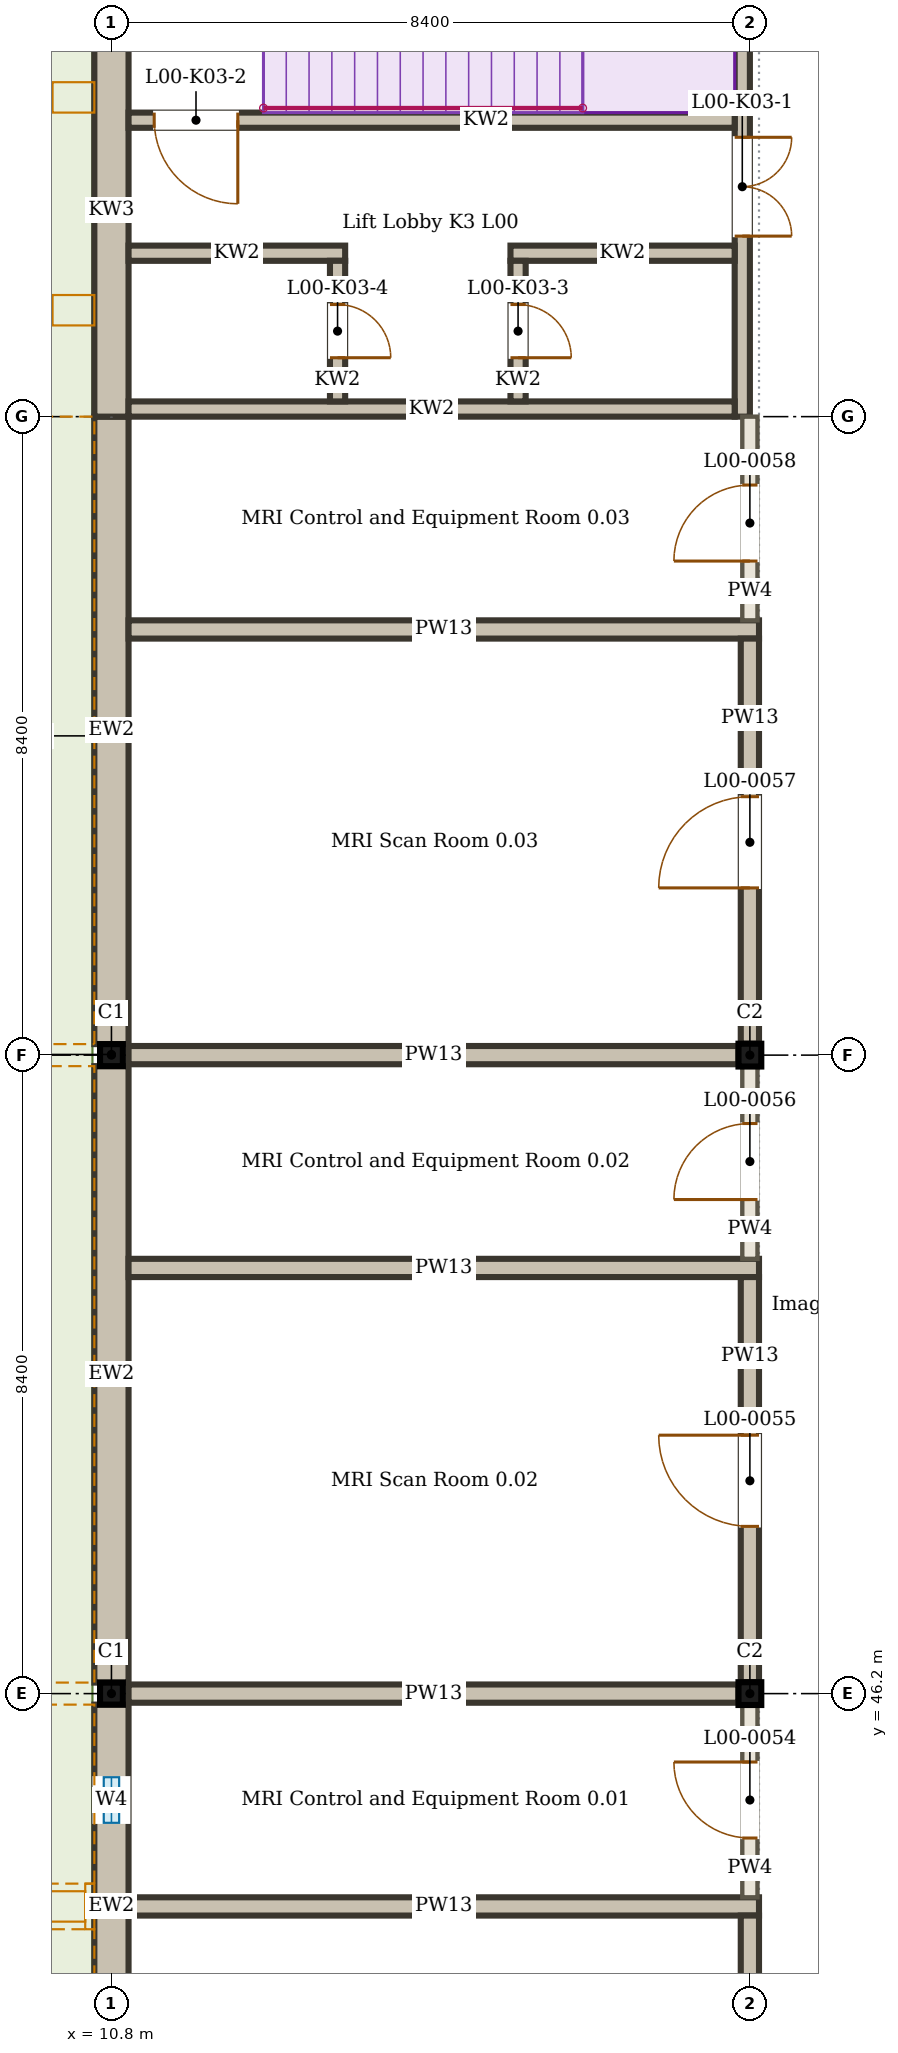
"""IFC4 building model, lengths in metres.
Left out: names, types, materials, properties, quantities, classifications, styles, units other than length and angle.
Written with IfcOpenShell. Run it as: python <this file> out.ifc"""

import sys

from ifc_helpers import new_model, si_unit, direction, frame, frame_2d, origin, origin_2d, place, context, subcontext, project, spatial, rectangle, i_section, extrude, element, fill, save


model = new_model("IFC4")
c1 = context("Model", 3, precision=1e-05, world=origin(), true_north=direction((0.0, 1.0)))
c2 = subcontext(c1, "Body", "Model", "MODEL_VIEW")
j1 = project(units=[si_unit("LENGTHUNIT", "METRE"), si_unit("PLANEANGLEUNIT", "RADIAN")], contexts=[c1])
p1 = place(None, origin())
s1 = spatial("IfcSite", under=j1, at=p1, CompositionType="ELEMENT")
p2 = place(p1, origin())
s2 = spatial("IfcBuilding", under=s1, at=p2, CompositionType="ELEMENT")
p3 = place(p2, origin())
s3 = spatial("IfcBuildingStorey", under=s2, at=p3, CompositionType="ELEMENT", Elevation=0.0)
p4 = place(p3, frame((10.8, 46.2, 0.0), z_axis=(0.0, 0.0, 1.0), x_axis=(1.0, 0.0, 0.0)))
e1 = element("IfcColumn", 1, at=p4, inside=s3, PredefinedType="COLUMN", context=c2, shape_type="SweptSolid", body=[
    extrude(i_section(OverallWidth=0.3, OverallDepth=0.29, WebThickness=0.009, FlangeThickness=0.014, FilletRadius=0.027, at=origin_2d()), origin(), (0.0, 0.0, 1.0), 4.5),
])
p5 = place(p3, frame((19.2, 46.2, 0.0), z_axis=(0.0, 0.0, 1.0), x_axis=(1.0, 0.0, 0.0)))
e2 = element("IfcColumn", 2, at=p5, inside=s3, PredefinedType="COLUMN", context=c2, shape_type="SweptSolid", body=[
    extrude(i_section(OverallWidth=0.3, OverallDepth=0.3, WebThickness=0.011, FlangeThickness=0.019, FilletRadius=0.027, at=origin_2d()), origin(), (0.0, 0.0, 1.0), 4.5),
])
p6 = place(p3, frame((10.8, 54.6, 0.0), z_axis=(0.0, 0.0, 1.0), x_axis=(1.0, 0.0, 0.0)))
e3 = element("IfcColumn", 3, at=p6, inside=s3, PredefinedType="COLUMN", context=c2, shape_type="SweptSolid", body=[
    extrude(i_section(OverallWidth=0.3, OverallDepth=0.29, WebThickness=0.009, FlangeThickness=0.014, FilletRadius=0.027, at=origin_2d()), origin(), (0.0, 0.0, 1.0), 4.5),
])
p7 = place(p3, frame((19.2, 54.6, 0.0), z_axis=(0.0, 0.0, 1.0), x_axis=(1.0, 0.0, 0.0)))
e4 = element("IfcColumn", 4, at=p7, inside=s3, PredefinedType="COLUMN", context=c2, shape_type="SweptSolid", body=[
    extrude(i_section(OverallWidth=0.3, OverallDepth=0.3, WebThickness=0.011, FlangeThickness=0.019, FilletRadius=0.027, at=origin_2d()), origin(), (0.0, 0.0, 1.0), 4.5),
])
p8 = place(p3, frame((10.8, 37.8, 0.0), z_axis=(0.0, 0.0, 1.0), x_axis=(0.0, 1.0, 0.0)))
e5 = element("IfcWall", 5, at=p8, inside=s3, PredefinedType="SOLIDWALL", context=c2, shape_type="SweptSolid", body=[
    extrude(rectangle(XDim=8.255, YDim=0.45, at=frame_2d((4.127, 0.0))), origin(), (0.0, 0.0, 1.0), 3.85),
])
p9 = place(p8, frame((1.1, 0.0, 2.1)))
e6 = element("IfcOpeningElement", 6, at=p9, cuts=e5, PredefinedType="OPENING", context=c2, shape_type="SweptSolid", body=[
    extrude(rectangle(XDim=0.6, YDim=1.2, at=frame_2d((0.3, 0.6))), frame((0.0, 0.235, 0.0), z_axis=(0.0, -1.0, 0.0), x_axis=(1.0, 0.0, 0.0)), (0.0, 0.0, 1.0), 0.47),
])
p10 = place(p8, frame((3.9, 0.0, 2.1)))
e7 = element("IfcOpeningElement", 7, at=p10, cuts=e5, PredefinedType="OPENING", context=c2, shape_type="SweptSolid", body=[
    extrude(rectangle(XDim=0.6, YDim=1.2, at=frame_2d((0.3, 0.6))), frame((0.0, 0.235, 0.0), z_axis=(0.0, -1.0, 0.0), x_axis=(1.0, 0.0, 0.0)), (0.0, 0.0, 1.0), 0.47),
])
p11 = place(p8, frame((6.7, 0.0, 2.1)))
e8 = element("IfcOpeningElement", 8, at=p11, cuts=e5, PredefinedType="OPENING", context=c2, shape_type="SweptSolid", body=[
    extrude(rectangle(XDim=0.6, YDim=1.2, at=frame_2d((0.3, 0.6))), frame((0.0, 0.235, 0.0), z_axis=(0.0, -1.0, 0.0), x_axis=(1.0, 0.0, 0.0)), (0.0, 0.0, 1.0), 0.47),
])
p12 = place(p3, frame((10.64, 37.8, 3.87), z_axis=(0.0, 0.0, 1.0), x_axis=(0.0, 1.0, 0.0)))
e9 = element("IfcWall", 9, at=p12, inside=s3, PredefinedType="SOLIDWALL", context=c2, shape_type="SweptSolid", body=[
    extrude(rectangle(XDim=8.4, YDim=0.13, at=frame_2d((4.2, 0.0))), origin(), (0.0, 0.0, 1.0), 0.63),
])
p13 = place(p3, frame((10.8, 46.345, 0.0), z_axis=(0.0, 0.0, 1.0), x_axis=(0.0, 1.0, 0.0)))
e10 = element("IfcWall", 10, at=p13, inside=s3, PredefinedType="SOLIDWALL", context=c2, shape_type="SweptSolid", body=[
    extrude(rectangle(XDim=8.11, YDim=0.45, at=frame_2d((4.055, 0.0))), origin(), (0.0, 0.0, 1.0), 3.85),
])
p14 = place(p3, frame((10.64, 46.2, 3.87), z_axis=(0.0, 0.0, 1.0), x_axis=(0.0, 1.0, 0.0)))
e11 = element("IfcWall", 11, at=p14, inside=s3, PredefinedType="SOLIDWALL", context=c2, shape_type="SweptSolid", body=[
    extrude(rectangle(XDim=8.4, YDim=0.13, at=frame_2d((4.2, 0.0))), origin(), (0.0, 0.0, 1.0), 0.63),
])
p15 = place(p3, frame((10.8, 54.745, 0.0), z_axis=(0.0, 0.0, 1.0), x_axis=(0.0, 1.0, 0.0)))
e12 = element("IfcWall", 12, at=p15, inside=s3, PredefinedType="SOLIDWALL", context=c2, shape_type="SweptSolid", body=[
    extrude(rectangle(XDim=8.255, YDim=0.45, at=frame_2d((4.127, 0.0))), origin(), (0.0, 0.0, 1.0), 3.85),
])
p16 = place(p3, frame((10.64, 54.6, 3.87), z_axis=(0.0, 0.0, 1.0), x_axis=(0.0, 1.0, 0.0)))
e13 = element("IfcWall", 13, at=p16, inside=s3, PredefinedType="SOLIDWALL", context=c2, shape_type="SweptSolid", body=[
    extrude(rectangle(XDim=8.4, YDim=0.13, at=frame_2d((4.2, 0.0))), origin(), (0.0, 0.0, 1.0), 0.63),
])
p17 = place(p3, frame((11.025, 43.4, 0.0), z_axis=(0.0, 0.0, 1.0), x_axis=(1.0, 0.0, 0.0)))
e14 = element("IfcWall", 14, at=p17, inside=s3, PredefinedType="SOLIDWALL", context=c2, shape_type="SweptSolid", body=[
    extrude(rectangle(XDim=8.295, YDim=0.24, at=frame_2d((4.147, 0.0))), origin(), (0.0, 0.0, 1.0), 3.8),
])
p18 = place(p3, frame((11.025, 46.2, 0.0), z_axis=(0.0, 0.0, 1.0), x_axis=(1.0, 0.0, 0.0)))
e15 = element("IfcWall", 15, at=p18, inside=s3, PredefinedType="SOLIDWALL", context=c2, shape_type="SweptSolid", body=[
    extrude(rectangle(XDim=8.025, YDim=0.24, at=frame_2d((4.013, 0.0))), origin(), (0.0, 0.0, 1.0), 3.8),
])
p19 = place(p3, frame((11.025, 51.8, 0.0), z_axis=(0.0, 0.0, 1.0), x_axis=(1.0, 0.0, 0.0)))
e16 = element("IfcWall", 16, at=p19, inside=s3, PredefinedType="SOLIDWALL", context=c2, shape_type="SweptSolid", body=[
    extrude(rectangle(XDim=8.295, YDim=0.24, at=frame_2d((4.147, 0.0))), origin(), (0.0, 0.0, 1.0), 3.8),
])
p20 = place(p3, frame((11.025, 54.6, 0.0), z_axis=(0.0, 0.0, 1.0), x_axis=(1.0, 0.0, 0.0)))
e17 = element("IfcWall", 17, at=p20, inside=s3, PredefinedType="SOLIDWALL", context=c2, shape_type="SweptSolid", body=[
    extrude(rectangle(XDim=8.025, YDim=0.24, at=frame_2d((4.013, 0.0))), origin(), (0.0, 0.0, 1.0), 3.8),
])
p21 = place(p3, frame((11.025, 60.2, 0.0), z_axis=(0.0, 0.0, 1.0), x_axis=(1.0, 0.0, 0.0)))
e18 = element("IfcWall", 18, at=p21, inside=s3, PredefinedType="SOLIDWALL", context=c2, shape_type="SweptSolid", body=[
    extrude(rectangle(XDim=8.295, YDim=0.24, at=frame_2d((4.147, 0.0))), origin(), (0.0, 0.0, 1.0), 3.8),
])
p22 = place(p3, frame((19.2, 37.8, 0.0), z_axis=(0.0, 0.0, 1.0), x_axis=(0.0, 1.0, 0.0)))
e19 = element("IfcWall", 19, at=p22, inside=s3, PredefinedType="SOLIDWALL", context=c2, shape_type="SweptSolid", body=[
    extrude(rectangle(XDim=5.48, YDim=0.24, at=frame_2d((2.74, 0.0))), origin(), (0.0, 0.0, 1.0), 3.8),
])
p23 = place(p22, frame((2.2, 0.0, 0.0)))
e20 = element("IfcOpeningElement", 20, at=p23, cuts=e19, PredefinedType="OPENING", context=c2, shape_type="SweptSolid", body=[
    extrude(rectangle(XDim=1.2, YDim=2.1, at=frame_2d((0.6, 1.05))), frame((0.0, 0.13, 0.0), z_axis=(0.0, -1.0, 0.0), x_axis=(1.0, 0.0, 0.0)), (0.0, 0.0, 1.0), 0.26),
])
p24 = place(p3, frame((19.2, 43.52, 0.0), z_axis=(0.0, 0.0, 1.0), x_axis=(0.0, 1.0, 0.0)))
e21 = element("IfcWall", 21, at=p24, inside=s3, PredefinedType="PARTITIONING", context=c2, shape_type="SweptSolid", body=[
    extrude(rectangle(XDim=2.53, YDim=0.2, at=frame_2d((1.265, 0.0))), origin(), (0.0, 0.0, 1.0), 3.8),
])
p25 = place(p24, frame((0.78, 0.0, 0.0)))
e22 = element("IfcOpeningElement", 22, at=p25, cuts=e21, PredefinedType="OPENING", context=c2, shape_type="SweptSolid", body=[
    extrude(rectangle(XDim=1.0, YDim=2.1, at=frame_2d((0.5, 1.05))), frame((0.0, 0.11, 0.0), z_axis=(0.0, -1.0, 0.0), x_axis=(1.0, 0.0, 0.0)), (0.0, 0.0, 1.0), 0.22),
])
p26 = place(p3, frame((19.2, 46.35, 0.0), z_axis=(0.0, 0.0, 1.0), x_axis=(0.0, 1.0, 0.0)))
e23 = element("IfcWall", 23, at=p26, inside=s3, PredefinedType="SOLIDWALL", context=c2, shape_type="SweptSolid", body=[
    extrude(rectangle(XDim=5.33, YDim=0.24, at=frame_2d((2.665, 0.0))), origin(), (0.0, 0.0, 1.0), 3.8),
])
p27 = place(p26, frame((2.05, 0.0, 0.0)))
e24 = element("IfcOpeningElement", 24, at=p27, cuts=e23, PredefinedType="OPENING", context=c2, shape_type="SweptSolid", body=[
    extrude(rectangle(XDim=1.2, YDim=2.1, at=frame_2d((0.6, 1.05))), frame((0.0, 0.13, 0.0), z_axis=(0.0, -1.0, 0.0), x_axis=(1.0, 0.0, 0.0)), (0.0, 0.0, 1.0), 0.26),
])
p28 = place(p3, frame((19.2, 51.92, 0.0), z_axis=(0.0, 0.0, 1.0), x_axis=(0.0, 1.0, 0.0)))
e25 = element("IfcWall", 25, at=p28, inside=s3, PredefinedType="PARTITIONING", context=c2, shape_type="SweptSolid", body=[
    extrude(rectangle(XDim=2.53, YDim=0.2, at=frame_2d((1.265, 0.0))), origin(), (0.0, 0.0, 1.0), 3.8),
])
p29 = place(p28, frame((0.78, 0.0, 0.0)))
e26 = element("IfcOpeningElement", 26, at=p29, cuts=e25, PredefinedType="OPENING", context=c2, shape_type="SweptSolid", body=[
    extrude(rectangle(XDim=1.0, YDim=2.1, at=frame_2d((0.5, 1.05))), frame((0.0, 0.11, 0.0), z_axis=(0.0, -1.0, 0.0), x_axis=(1.0, 0.0, 0.0)), (0.0, 0.0, 1.0), 0.22),
])
p30 = place(p3, frame((19.2, 54.75, 0.0), z_axis=(0.0, 0.0, 1.0), x_axis=(0.0, 1.0, 0.0)))
e27 = element("IfcWall", 27, at=p30, inside=s3, PredefinedType="SOLIDWALL", context=c2, shape_type="SweptSolid", body=[
    extrude(rectangle(XDim=5.33, YDim=0.24, at=frame_2d((2.665, 0.0))), origin(), (0.0, 0.0, 1.0), 3.8),
])
p31 = place(p30, frame((2.05, 0.0, 0.0)))
e28 = element("IfcOpeningElement", 28, at=p31, cuts=e27, PredefinedType="OPENING", context=c2, shape_type="SweptSolid", body=[
    extrude(rectangle(XDim=1.2, YDim=2.1, at=frame_2d((0.6, 1.05))), frame((0.0, 0.13, 0.0), z_axis=(0.0, -1.0, 0.0), x_axis=(1.0, 0.0, 0.0)), (0.0, 0.0, 1.0), 0.26),
])
p32 = place(p3, frame((19.2, 60.32, 0.0), z_axis=(0.0, 0.0, 1.0), x_axis=(0.0, 1.0, 0.0)))
e29 = element("IfcWall", 29, at=p32, inside=s3, PredefinedType="PARTITIONING", context=c2, shape_type="SweptSolid", body=[
    extrude(rectangle(XDim=2.68, YDim=0.2, at=frame_2d((1.34, 0.0))), origin(), (0.0, 0.0, 1.0), 3.8),
])
p33 = place(p32, frame((0.78, 0.0, 0.0)))
e30 = element("IfcOpeningElement", 30, at=p33, cuts=e29, PredefinedType="OPENING", context=c2, shape_type="SweptSolid", body=[
    extrude(rectangle(XDim=1.0, YDim=2.1, at=frame_2d((0.5, 1.05))), frame((0.0, 0.11, 0.0), z_axis=(0.0, -1.0, 0.0), x_axis=(1.0, 0.0, 0.0)), (0.0, 0.0, 1.0), 0.22),
])
p34 = place(p3, frame((19.1, 71.4, 0.0), z_axis=(0.0, 0.0, 1.0), x_axis=(0.0, -1.0, 0.0)))
e31 = element("IfcWall", 31, at=p34, inside=s3, PredefinedType="SOLIDWALL", context=c2, shape_type="SweptSolid", body=[
    extrude(rectangle(XDim=8.4, YDim=0.2, at=frame_2d((4.2, 0.0))), origin(), (0.0, 0.0, 1.0), 4.5),
])
p35 = place(p34, frame((4.725, 0.0, 0.0)))
e32 = element("IfcOpeningElement", 32, at=p35, cuts=e31, PredefinedType="OPENING", context=c2, shape_type="SweptSolid", body=[
    extrude(rectangle(XDim=1.3, YDim=2.1, at=frame_2d((0.65, 1.05))), frame((0.0, 0.11, 0.0), z_axis=(0.0, -1.0, 0.0), x_axis=(1.0, 0.0, 0.0)), (0.0, 0.0, 1.0), 0.22),
])
p36 = place(p3, frame((10.8, 71.4, 0.0), z_axis=(0.0, 0.0, 1.0), x_axis=(0.0, -1.0, 0.0)))
e33 = element("IfcWall", 33, at=p36, inside=s3, PredefinedType="SOLIDWALL", context=c2, shape_type="SweptSolid", body=[
    extrude(rectangle(XDim=8.4, YDim=0.45, at=frame_2d((4.2, 0.0))), origin(), (0.0, 0.0, 1.0), 4.5),
])
p37 = place(p36, frame((1.65, 0.0, 0.0)))
e34 = element("IfcOpeningElement", 34, at=p37, cuts=e33, PredefinedType="OPENING", context=c2, shape_type="SweptSolid", body=[
    extrude(rectangle(XDim=1.3, YDim=2.1, at=frame_2d((0.65, 1.05))), frame((0.0, 0.235, 0.0), z_axis=(0.0, -1.0, 0.0), x_axis=(1.0, 0.0, 0.0)), (0.0, 0.0, 1.0), 0.47),
])
p38 = place(p3, frame((19.0, 63.1, 0.0), z_axis=(0.0, 0.0, 1.0), x_axis=(-1.0, 0.0, 0.0)))
e35 = element("IfcWall", 35, at=p38, inside=s3, PredefinedType="SOLIDWALL", context=c2, shape_type="SweptSolid", body=[
    extrude(rectangle(XDim=7.975, YDim=0.2, at=frame_2d((3.988, 0.0))), origin(), (0.0, 0.0, 1.0), 4.5),
])
p39 = place(p3, frame((19.0, 66.9, 0.0), z_axis=(0.0, 0.0, 1.0), x_axis=(-1.0, 0.0, 0.0)))
e36 = element("IfcWall", 36, at=p39, inside=s3, PredefinedType="SOLIDWALL", context=c2, shape_type="SweptSolid", body=[
    extrude(rectangle(XDim=7.975, YDim=0.2, at=frame_2d((3.988, 0.0))), origin(), (0.0, 0.0, 1.0), 4.5),
])
p40 = place(p39, frame((6.538, 0.0, 0.0)))
e37 = element("IfcOpeningElement", 37, at=p40, cuts=e36, PredefinedType="OPENING", context=c2, shape_type="SweptSolid", body=[
    extrude(rectangle(XDim=1.1, YDim=2.1, at=frame_2d((0.55, 1.05))), frame((0.0, 0.11, 0.0), z_axis=(0.0, -1.0, 0.0), x_axis=(1.0, 0.0, 0.0)), (0.0, 0.0, 1.0), 0.22),
])
p41 = place(p3, frame((19.0, 65.15, 0.0), z_axis=(0.0, 0.0, 1.0), x_axis=(-1.0, 0.0, 0.0)))
e38 = element("IfcWall", 38, at=p41, inside=s3, PredefinedType="SOLIDWALL", context=c2, shape_type="SweptSolid", body=[
    extrude(rectangle(XDim=2.95, YDim=0.2, at=frame_2d((1.475, 0.0))), origin(), (0.0, 0.0, 1.0), 4.35),
])
p42 = place(p3, frame((13.875, 65.15, 0.0), z_axis=(0.0, 0.0, 1.0), x_axis=(-1.0, 0.0, 0.0)))
e39 = element("IfcWall", 39, at=p42, inside=s3, PredefinedType="SOLIDWALL", context=c2, shape_type="SweptSolid", body=[
    extrude(rectangle(XDim=2.85, YDim=0.2, at=frame_2d((1.425, 0.0))), origin(), (0.0, 0.0, 1.0), 4.35),
])
p43 = place(p3, frame((16.15, 65.05, 0.0), z_axis=(0.0, 0.0, 1.0), x_axis=(0.0, -1.0, 0.0)))
e40 = element("IfcWall", 40, at=p43, inside=s3, PredefinedType="SOLIDWALL", context=c2, shape_type="SweptSolid", body=[
    extrude(rectangle(XDim=1.85, YDim=0.2, at=frame_2d((0.925, 0.0))), origin(), (0.0, 0.0, 1.0), 4.35),
])
p44 = place(p43, frame((0.575, 0.0, 0.0)))
e41 = element("IfcOpeningElement", 41, at=p44, cuts=e40, PredefinedType="OPENING", context=c2, shape_type="SweptSolid", body=[
    extrude(rectangle(XDim=0.7, YDim=2.1, at=frame_2d((0.35, 1.05))), frame((0.0, 0.11, 0.0), z_axis=(0.0, -1.0, 0.0), x_axis=(1.0, 0.0, 0.0)), (0.0, 0.0, 1.0), 0.22),
])
p45 = place(p3, frame((13.775, 65.05, 0.0), z_axis=(0.0, 0.0, 1.0), x_axis=(0.0, -1.0, 0.0)))
e42 = element("IfcWall", 42, at=p45, inside=s3, PredefinedType="SOLIDWALL", context=c2, shape_type="SweptSolid", body=[
    extrude(rectangle(XDim=1.85, YDim=0.2, at=frame_2d((0.925, 0.0))), origin(), (0.0, 0.0, 1.0), 4.35),
])
p46 = place(p45, frame((0.575, 0.0, 0.0)))
e43 = element("IfcOpeningElement", 43, at=p46, cuts=e42, PredefinedType="OPENING", context=c2, shape_type="SweptSolid", body=[
    extrude(rectangle(XDim=0.7, YDim=2.1, at=frame_2d((0.35, 1.05))), frame((0.0, 0.11, 0.0), z_axis=(0.0, -1.0, 0.0), x_axis=(1.0, 0.0, 0.0)), (0.0, 0.0, 1.0), 0.22),
])
p47 = place(p11, origin())
e44 = element("IfcWindow", 44, at=p47, inside=s3, PartitioningType="SINGLE_PANEL", PredefinedType="WINDOW", context=c2, shape_type="SweptSolid", body=[
    extrude(rectangle(XDim=0.6, YDim=1.2, at=frame_2d((0.3, 0.6))), frame((0.0, -0.075, 0.0), z_axis=(0.0, -1.0, 0.0), x_axis=(1.0, 0.0, 0.0)), (0.0, 0.0, 1.0), 0.06),
])
fill(e8, e44)
p48 = place(p25, origin())
e45 = element("IfcDoor", 45, at=p48, inside=s3, OperationType="SINGLE_SWING_RIGHT", PredefinedType="DOOR", context=c2, shape_type="SweptSolid", body=[
    extrude(rectangle(XDim=1.0, YDim=2.1, at=frame_2d((0.5, 1.05))), frame((0.0, 0.025, 0.0), z_axis=(0.0, -1.0, 0.0), x_axis=(1.0, 0.0, 0.0)), (0.0, 0.0, 1.0), 0.05),
])
fill(e22, e45)
p49 = place(p27, origin())
e46 = element("IfcDoor", 46, at=p49, inside=s3, OperationType="SINGLE_SWING_RIGHT", PredefinedType="DOOR", context=c2, shape_type="SweptSolid", body=[
    extrude(rectangle(XDim=1.2, YDim=2.1, at=frame_2d((0.6, 1.05))), frame((0.0, 0.025, 0.0), z_axis=(0.0, -1.0, 0.0), x_axis=(1.0, 0.0, 0.0)), (0.0, 0.0, 1.0), 0.05),
])
fill(e24, e46)
p50 = place(p29, origin())
e47 = element("IfcDoor", 47, at=p50, inside=s3, OperationType="SINGLE_SWING_LEFT", PredefinedType="DOOR", context=c2, shape_type="SweptSolid", body=[
    extrude(rectangle(XDim=1.0, YDim=2.1, at=frame_2d((0.5, 1.05))), frame((0.0, 0.025, 0.0), z_axis=(0.0, -1.0, 0.0), x_axis=(1.0, 0.0, 0.0)), (0.0, 0.0, 1.0), 0.05),
])
fill(e26, e47)
p51 = place(p31, origin())
e48 = element("IfcDoor", 48, at=p51, inside=s3, OperationType="SINGLE_SWING_LEFT", PredefinedType="DOOR", context=c2, shape_type="SweptSolid", body=[
    extrude(rectangle(XDim=1.2, YDim=2.1, at=frame_2d((0.6, 1.05))), frame((0.0, 0.025, 0.0), z_axis=(0.0, -1.0, 0.0), x_axis=(1.0, 0.0, 0.0)), (0.0, 0.0, 1.0), 0.05),
])
fill(e28, e48)
p52 = place(p33, origin())
e49 = element("IfcDoor", 49, at=p52, inside=s3, OperationType="SINGLE_SWING_LEFT", PredefinedType="DOOR", context=c2, shape_type="SweptSolid", body=[
    extrude(rectangle(XDim=1.0, YDim=2.1, at=frame_2d((0.5, 1.05))), frame((0.0, 0.025, 0.0), z_axis=(0.0, -1.0, 0.0), x_axis=(1.0, 0.0, 0.0)), (0.0, 0.0, 1.0), 0.05),
])
fill(e30, e49)
p53 = place(p35, origin())
e50 = element("IfcDoor", 50, at=p53, inside=s3, OperationType="DOUBLE_DOOR_DOUBLE_SWING", PredefinedType="DOOR", context=c2, shape_type="SweptSolid", body=[
    extrude(rectangle(XDim=1.3, YDim=2.1, at=frame_2d((0.65, 1.05))), frame((0.0, 0.025, 0.0), z_axis=(0.0, -1.0, 0.0), x_axis=(1.0, 0.0, 0.0)), (0.0, 0.0, 1.0), 0.05),
])
fill(e32, e50)
p54 = place(p40, origin())
e51 = element("IfcDoor", 51, at=p54, inside=s3, OperationType="SINGLE_SWING_LEFT", PredefinedType="DOOR", context=c2, shape_type="SweptSolid", body=[
    extrude(rectangle(XDim=1.1, YDim=2.1, at=frame_2d((0.55, 1.05))), frame((0.0, 0.025, 0.0), z_axis=(0.0, -1.0, 0.0), x_axis=(1.0, 0.0, 0.0)), (0.0, 0.0, 1.0), 0.05),
])
fill(e37, e51)
p55 = place(p44, origin())
e52 = element("IfcDoor", 52, at=p55, inside=s3, OperationType="SINGLE_SWING_RIGHT", PredefinedType="DOOR", context=c2, shape_type="SweptSolid", body=[
    extrude(rectangle(XDim=0.7, YDim=2.1, at=frame_2d((0.35, 1.05))), frame((0.0, 0.025, 0.0), z_axis=(0.0, -1.0, 0.0), x_axis=(1.0, 0.0, 0.0)), (0.0, 0.0, 1.0), 0.05),
])
fill(e41, e52)
p56 = place(p46, origin())
e53 = element("IfcDoor", 53, at=p56, inside=s3, OperationType="SINGLE_SWING_RIGHT", PredefinedType="DOOR", context=c2, shape_type="SweptSolid", body=[
    extrude(rectangle(XDim=0.7, YDim=2.1, at=frame_2d((0.35, 1.05))), frame((0.0, 0.025, 0.0), z_axis=(0.0, -1.0, 0.0), x_axis=(1.0, 0.0, 0.0)), (0.0, 0.0, 1.0), 0.05),
])
fill(e43, e53)
save(model, sys.argv[1])
